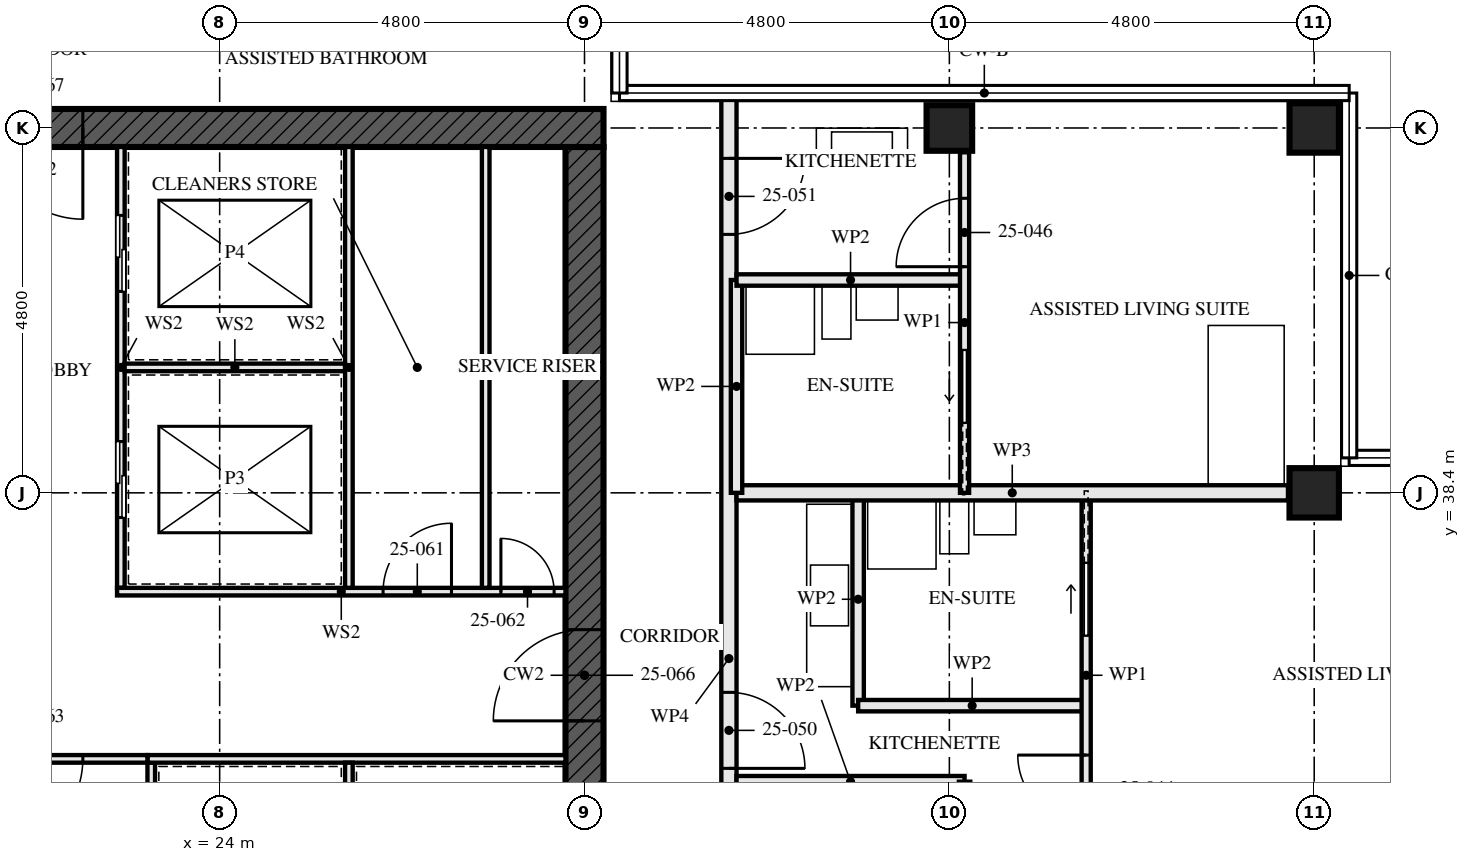
"""IFC4 building model, lengths in metres.
Left out: names, types, materials, properties, quantities, classifications, styles, units other than length and angle.
Written with IfcOpenShell. Run it as: python <this file> out.ifc"""

import sys

from ifc_helpers import new_model, si_unit, direction, frame, frame_2d, origin, origin_2d, place, context, subcontext, project, spatial, rectangle, hollow_rectangle, extrude, element, fill, save


model = new_model("IFC4")
c1 = context("Model", 3, precision=1e-05, world=origin(), true_north=direction((0.0, 1.0)))
c2 = subcontext(c1, "Body", "Model", "MODEL_VIEW")
j1 = project(units=[si_unit("LENGTHUNIT", "METRE"), si_unit("PLANEANGLEUNIT", "RADIAN")], contexts=[c1])
p1 = place(None, origin())
s1 = spatial("IfcSite", under=j1, at=p1, CompositionType="ELEMENT")
p2 = place(p1, origin())
s2 = spatial("IfcBuilding", under=s1, at=p2, CompositionType="ELEMENT")
p3 = place(p2, frame((0.0, 0.0, 94.5)))
s3 = spatial("IfcBuildingStorey", under=s2, at=p3, CompositionType="ELEMENT", Elevation=94.5)
p4 = place(p3, frame((33.6, 43.2, 0.0), z_axis=(0.0, 0.0, 1.0), x_axis=(0.0, 1.0, 0.0)))
e1 = element("IfcColumn", 1, at=p4, inside=s3, PredefinedType="COLUMN", context=c2, shape_type="SweptSolid", body=[
    extrude(hollow_rectangle(XDim=0.6, YDim=0.6, WallThickness=0.08, at=origin_2d()), origin(), (0.0, 0.0, 1.0), 3.5),
])
for number, where, z_axis, x_axis in (
    (2, (38.4, 38.4, 0.0), (0.0, 0.0, 1.0), (0.0, 1.0, 0.0)),
    (3, (38.4, 43.2, 0.0), (0.0, 0.0, 1.0), (0.0, 1.0, 0.0)),
):
    element("IfcColumn", number, at=place(p3, frame(where, z_axis=z_axis, x_axis=x_axis)), inside=s3, PredefinedType="COLUMN", context=c2, shape_type="SweptSolid", body=[
        extrude(hollow_rectangle(XDim=0.65, YDim=0.65, WallThickness=0.08, at=origin_2d()), origin(), (0.0, 0.0, 1.0), 3.5),
    ])
p5 = place(p3, frame((29.05, 43.2, -0.17), z_axis=(0.0, 0.0, 1.0), x_axis=(-1.0, 0.0, 0.0)))
e4 = element("IfcWall", 4, at=p5, inside=s3, PredefinedType="SHEAR", context=c2, shape_type="SweptSolid", body=[
    extrude(rectangle(XDim=14.9, YDim=0.5, at=frame_2d((7.45, 0.0))), origin(), (0.0, 0.0, 1.0), 3.5),
])
p6 = place(p5, frame((6.85, 0.0, 0.17)))
e5 = element("IfcOpeningElement", 5, at=p6, cuts=e4, PredefinedType="OPENING", context=c2, shape_type="SweptSolid", body=[
    extrude(rectangle(XDim=1.2, YDim=2.1, at=frame_2d((0.6, 1.05))), frame((0.0, 0.26, 0.0), z_axis=(0.0, -1.0, 0.0), x_axis=(1.0, 0.0, 0.0)), (0.0, 0.0, 1.0), 0.521),
])
p7 = place(p3, frame((28.8, 29.05, -0.17), z_axis=(0.0, 0.0, 1.0), x_axis=(0.0, 1.0, 0.0)))
e6 = element("IfcWall", 6, at=p7, inside=s3, PredefinedType="SHEAR", context=c2, shape_type="SweptSolid", body=[
    extrude(rectangle(XDim=13.9, YDim=0.5, at=frame_2d((6.95, 0.0))), origin(), (0.0, 0.0, 1.0), 3.5),
])
p8 = place(p7, frame((6.35, 0.0, 0.17)))
e7 = element("IfcOpeningElement", 7, at=p8, cuts=e6, PredefinedType="OPENING", context=c2, shape_type="SweptSolid", body=[
    extrude(rectangle(XDim=1.2, YDim=2.1, at=frame_2d((0.6, 1.05))), frame((0.0, 0.26, 0.0), z_axis=(0.0, -1.0, 0.0), x_axis=(1.0, 0.0, 0.0)), (0.0, 0.0, 1.0), 0.521),
])
p9 = place(p3, frame((33.8, 32.2, 0.0), z_axis=(0.0, 0.0, 1.0), x_axis=(0.0, 1.0, 0.0)))
e8 = element("IfcWall", 8, at=p9, inside=s3, PredefinedType="PARTITIONING", context=c2, shape_type="SweptSolid", body=[
    extrude(rectangle(XDim=2.4, YDim=0.15, at=frame_2d((1.2, 0.0))), origin(), (0.0, 0.0, 1.0), 2.55),
])
for number, where, z_axis, x_axis in (
    (9, (33.8, 34.6, 0.0), (0.0, 0.0, 1.0), (-1.0, 0.0, 0.0)),
    (10, (35.4, 35.6, 0.0), (0.0, 0.0, 1.0), (-1.0, 0.0, 0.0)),
):
    element("IfcWall", number, at=place(p3, frame(where, z_axis=z_axis, x_axis=x_axis)), inside=s3, PredefinedType="PARTITIONING", context=c2, shape_type="SweptSolid", body=[
        extrude(rectangle(XDim=3.0, YDim=0.15, at=frame_2d((1.5, 0.0))), origin(), (0.0, 0.0, 1.0), 3.33),
    ])
p10 = place(p3, frame((32.4, 35.6, 0.0), z_axis=(0.0, 0.0, 1.0), x_axis=(0.0, 1.0, 0.0)))
e11 = element("IfcWall", 11, at=p10, inside=s3, PredefinedType="PARTITIONING", context=c2, shape_type="SweptSolid", body=[
    extrude(rectangle(XDim=2.8, YDim=0.15, at=frame_2d((1.4, 0.0))), origin(), (0.0, 0.0, 1.0), 3.33),
])
p11 = place(p3, frame((35.4, 33.6, 0.0), z_axis=(0.0, 0.0, 1.0), x_axis=(0.0, 1.0, 0.0)))
e12 = element("IfcWall", 12, at=p11, inside=s3, PredefinedType="PARTITIONING", context=c2, shape_type="SweptSolid", body=[
    extrude(rectangle(XDim=4.8, YDim=0.12, at=frame_2d((2.4, 0.0))), origin(), (0.0, 0.0, 1.0), 3.33),
])
p12 = place(p11, frame((0.45, 0.0, 0.0)))
e13 = element("IfcOpeningElement", 13, at=p12, cuts=e12, PredefinedType="OPENING", context=c2, shape_type="SweptSolid", body=[
    extrude(rectangle(XDim=0.9, YDim=2.1, at=frame_2d((0.45, 1.05))), frame((0.0, 0.071, 0.0), z_axis=(0.0, -1.0, 0.0), x_axis=(1.0, 0.0, 0.0)), (0.0, 0.0, 1.0), 0.141),
])
p13 = place(p11, frame((2.925, 0.0, 0.0)))
e14 = element("IfcOpeningElement", 14, at=p13, cuts=e12, PredefinedType="OPENING", context=c2, shape_type="SweptSolid", body=[
    extrude(rectangle(XDim=0.95, YDim=2.1, at=frame_2d((0.475, 1.05))), frame((0.0, 0.071, 0.0), z_axis=(0.0, -1.0, 0.0), x_axis=(1.0, 0.0, 0.0)), (0.0, 0.0, 1.0), 0.141),
])
p14 = place(p3, frame((38.055, 38.4, 0.0), z_axis=(0.0, 0.0, 1.0), x_axis=(-1.0, 0.0, 0.0)))
e15 = element("IfcWall", 15, at=p14, inside=s3, PredefinedType="PARTITIONING", context=c2, shape_type="SweptSolid", body=[
    extrude(rectangle(XDim=7.255, YDim=0.2, at=frame_2d((3.627, 0.0))), origin(), (0.0, 0.0, 1.0), 2.55),
])
p15 = place(p3, frame((33.8, 41.2, 0.0), z_axis=(0.0, 0.0, 1.0), x_axis=(-1.0, 0.0, 0.0)))
e16 = element("IfcWall", 16, at=p15, inside=s3, PredefinedType="PARTITIONING", context=c2, shape_type="SweptSolid", body=[
    extrude(rectangle(XDim=3.0, YDim=0.15, at=frame_2d((1.5, 0.0))), origin(), (0.0, 0.0, 1.0), 3.33),
])
p16 = place(p3, frame((30.8, 38.4, 0.0), z_axis=(0.0, 0.0, 1.0), x_axis=(0.0, 1.0, 0.0)))
e17 = element("IfcWall", 17, at=p16, inside=s3, PredefinedType="PARTITIONING", context=c2, shape_type="SweptSolid", body=[
    extrude(rectangle(XDim=2.8, YDim=0.15, at=frame_2d((1.4, 0.0))), origin(), (0.0, 0.0, 1.0), 3.33),
])
p17 = place(p3, frame((33.8, 38.4, 0.0), z_axis=(0.0, 0.0, 1.0), x_axis=(0.0, 1.0, 0.0)))
e18 = element("IfcWall", 18, at=p17, inside=s3, PredefinedType="PARTITIONING", context=c2, shape_type="SweptSolid", body=[
    extrude(rectangle(XDim=4.48, YDim=0.12, at=frame_2d((2.24, 0.0))), origin(), (0.0, 0.0, 1.0), 3.33),
])
p18 = place(p17, frame((2.975, 0.0, 0.0)))
e19 = element("IfcOpeningElement", 19, at=p18, cuts=e18, PredefinedType="OPENING", context=c2, shape_type="SweptSolid", body=[
    extrude(rectangle(XDim=0.9, YDim=2.1, at=frame_2d((0.45, 1.05))), frame((0.0, 0.071, 0.0), z_axis=(0.0, -1.0, 0.0), x_axis=(1.0, 0.0, 0.0)), (0.0, 0.0, 1.0), 0.141),
])
p19 = place(p17, frame((0.925, 0.0, 0.0)))
e20 = element("IfcOpeningElement", 20, at=p19, cuts=e18, PredefinedType="OPENING", context=c2, shape_type="SweptSolid", body=[
    extrude(rectangle(XDim=0.95, YDim=2.1, at=frame_2d((0.475, 1.05))), frame((0.0, 0.071, 0.0), z_axis=(0.0, -1.0, 0.0), x_axis=(1.0, 0.0, 0.0)), (0.0, 0.0, 1.0), 0.141),
])
p20 = place(p3, frame((30.7, 28.8, 0.0), z_axis=(0.0, 0.0, 1.0), x_axis=(0.0, 1.0, 0.0)))
e21 = element("IfcWall", 21, at=p20, inside=s3, PredefinedType="PARTITIONING", context=c2, shape_type="SweptSolid", body=[
    extrude(rectangle(XDim=14.84, YDim=0.2, at=frame_2d((7.42, 0.0))), origin(), (0.0, 0.0, 1.0), 2.32),
])
p21 = place(p20, frame((1.4, 0.0, 0.0)))
e22 = element("IfcOpeningElement", 22, at=p21, cuts=e21, PredefinedType="OPENING", context=c2, shape_type="SweptSolid", body=[
    extrude(rectangle(XDim=1.0, YDim=2.1, at=frame_2d((0.5, 1.05))), frame((0.0, 0.111, 0.0), z_axis=(0.0, -1.0, 0.0), x_axis=(1.0, 0.0, 0.0)), (0.0, 0.0, 1.0), 0.221),
])
p22 = place(p20, frame((4.1, 0.0, 0.0)))
e23 = element("IfcOpeningElement", 23, at=p22, cuts=e21, PredefinedType="OPENING", context=c2, shape_type="SweptSolid", body=[
    extrude(rectangle(XDim=1.0, YDim=2.1, at=frame_2d((0.5, 1.05))), frame((0.0, 0.111, 0.0), z_axis=(0.0, -1.0, 0.0), x_axis=(1.0, 0.0, 0.0)), (0.0, 0.0, 1.0), 0.221),
])
p23 = place(p20, frame((5.975, 0.0, 0.0)))
e24 = element("IfcOpeningElement", 24, at=p23, cuts=e21, PredefinedType="OPENING", context=c2, shape_type="SweptSolid", body=[
    extrude(rectangle(XDim=1.0, YDim=2.1, at=frame_2d((0.5, 1.05))), frame((0.0, 0.111, 0.0), z_axis=(0.0, -1.0, 0.0), x_axis=(1.0, 0.0, 0.0)), (0.0, 0.0, 1.0), 0.221),
])
p24 = place(p20, frame((13.0, 0.0, 0.0)))
e25 = element("IfcOpeningElement", 25, at=p24, cuts=e21, PredefinedType="OPENING", context=c2, shape_type="SweptSolid", body=[
    extrude(rectangle(XDim=1.0, YDim=2.1, at=frame_2d((0.5, 1.05))), frame((0.0, 0.111, 0.0), z_axis=(0.0, -1.0, 0.0), x_axis=(1.0, 0.0, 0.0)), (0.0, 0.0, 1.0), 0.221),
])
p25 = place(p3, frame((27.5, 37.15, 0.0), z_axis=(0.0, 0.0, 1.0), x_axis=(0.0, 1.0, 0.0)))
e26 = element("IfcWall", 26, at=p25, inside=s3, PredefinedType="SOLIDWALL", context=c2, shape_type="SweptSolid", body=[
    extrude(rectangle(XDim=5.8, YDim=0.1, at=frame_2d((2.9, 0.0))), origin(), (0.0, 0.0, 1.0), 3.33),
])
p26 = place(p3, frame((22.7, 37.15, 0.0), z_axis=(0.0, 0.0, 1.0), x_axis=(0.0, 1.0, 0.0)))
e27 = element("IfcWall", 27, at=p26, inside=s3, PredefinedType="SOLIDWALL", context=c2, shape_type="SweptSolid", body=[
    extrude(rectangle(XDim=5.8, YDim=0.1, at=frame_2d((2.9, 0.0))), origin(), (0.0, 0.0, 1.0), 3.33),
])
p27 = place(p26, frame((0.925, 0.0, 0.0)))
e28 = element("IfcOpeningElement", 28, at=p27, cuts=e27, PredefinedType="OPENING", context=c2, shape_type="SweptSolid", body=[
    extrude(rectangle(XDim=1.0, YDim=2.1, at=frame_2d((0.5, 1.05))), frame((0.0, 0.061, 0.0), z_axis=(0.0, -1.0, 0.0), x_axis=(1.0, 0.0, 0.0)), (0.0, 0.0, 1.0), 0.121),
])
p28 = place(p26, frame((3.9, 0.0, 0.0)))
e29 = element("IfcOpeningElement", 29, at=p28, cuts=e27, PredefinedType="OPENING", context=c2, shape_type="SweptSolid", body=[
    extrude(rectangle(XDim=1.0, YDim=2.1, at=frame_2d((0.5, 1.05))), frame((0.0, 0.061, 0.0), z_axis=(0.0, -1.0, 0.0), x_axis=(1.0, 0.0, 0.0)), (0.0, 0.0, 1.0), 0.121),
])
p29 = place(p3, frame((23.1, 29.05, 0.0), z_axis=(0.0, 0.0, 1.0), x_axis=(0.0, 1.0, 0.0)))
e30 = element("IfcWall", 30, at=p29, inside=s3, PredefinedType="SOLIDWALL", context=c2, shape_type="SweptSolid", body=[
    extrude(rectangle(XDim=5.8, YDim=0.1, at=frame_2d((2.9, 0.0))), origin(), (0.0, 0.0, 1.0), 3.33),
])
p30 = place(p29, frame((1.0, 0.0, 0.0)))
e31 = element("IfcOpeningElement", 31, at=p30, cuts=e30, PredefinedType="OPENING", context=c2, shape_type="SweptSolid", body=[
    extrude(rectangle(XDim=0.7, YDim=2.1, at=frame_2d((0.35, 1.05))), frame((0.0, 0.061, 0.0), z_axis=(0.0, -1.0, 0.0), x_axis=(1.0, 0.0, 0.0)), (0.0, 0.0, 1.0), 0.121),
])
p31 = place(p3, frame((23.05, 34.9, 0.0), z_axis=(0.0, 0.0, 1.0), x_axis=(1.0, 0.0, 0.0)))
e32 = element("IfcWall", 32, at=p31, inside=s3, PredefinedType="SOLIDWALL", context=c2, shape_type="SweptSolid", body=[
    extrude(rectangle(XDim=5.5, YDim=0.1, at=frame_2d((2.75, 0.0))), origin(), (0.0, 0.0, 1.0), 3.33),
])
p32 = place(p3, frame((22.65, 37.1, 0.0), z_axis=(0.0, 0.0, 1.0), x_axis=(1.0, 0.0, 0.0)))
e33 = element("IfcWall", 33, at=p32, inside=s3, PredefinedType="SOLIDWALL", context=c2, shape_type="SweptSolid", body=[
    extrude(rectangle(XDim=5.9, YDim=0.1, at=frame_2d((2.95, 0.0))), origin(), (0.0, 0.0, 1.0), 3.33),
])
p33 = place(p32, frame((3.5, 0.0, 0.0)))
e34 = element("IfcOpeningElement", 34, at=p33, cuts=e33, PredefinedType="OPENING", context=c2, shape_type="SweptSolid", body=[
    extrude(rectangle(XDim=0.9, YDim=2.1, at=frame_2d((0.45, 1.05))), frame((0.0, 0.061, 0.0), z_axis=(0.0, -1.0, 0.0), x_axis=(1.0, 0.0, 0.0)), (0.0, 0.0, 1.0), 0.121),
])
p34 = place(p32, frame((5.05, 0.0, 0.0)))
e35 = element("IfcOpeningElement", 35, at=p34, cuts=e33, PredefinedType="OPENING", context=c2, shape_type="SweptSolid", body=[
    extrude(rectangle(XDim=0.7, YDim=2.1, at=frame_2d((0.35, 1.05))), frame((0.0, 0.061, 0.0), z_axis=(0.0, -1.0, 0.0), x_axis=(1.0, 0.0, 0.0)), (0.0, 0.0, 1.0), 0.121),
])
p35 = place(p3, frame((20.55, 34.9, 0.0), z_axis=(0.0, 0.0, 1.0), x_axis=(1.0, 0.0, 0.0)))
e36 = element("IfcWall", 36, at=p35, inside=s3, PredefinedType="SOLIDWALL", context=c2, shape_type="SweptSolid", body=[
    extrude(rectangle(XDim=2.5, YDim=0.1, at=frame_2d((1.25, 0.0))), origin(), (0.0, 0.0, 1.0), 3.33),
])
p36 = place(p35, frame((0.45, 0.0, 0.0)))
e37 = element("IfcOpeningElement", 37, at=p36, cuts=e36, PredefinedType="OPENING", context=c2, shape_type="SweptSolid", body=[
    extrude(rectangle(XDim=1.2, YDim=2.1, at=frame_2d((0.6, 1.05))), frame((0.0, 0.061, 0.0), z_axis=(0.0, -1.0, 0.0), x_axis=(1.0, 0.0, 0.0)), (0.0, 0.0, 1.0), 0.121),
])
p37 = place(p3, frame((22.75, 40.05, 0.0), z_axis=(0.0, 0.0, 1.0), x_axis=(1.0, 0.0, 0.0)))
e38 = element("IfcWall", 38, at=p37, inside=s3, PredefinedType="SOLIDWALL", context=c2, shape_type="SweptSolid", body=[
    extrude(rectangle(XDim=2.9, YDim=0.1, at=frame_2d((1.45, 0.0))), origin(), (0.0, 0.0, 1.0), 3.33),
])
p38 = place(p3, frame((25.7, 37.15, 0.0), z_axis=(0.0, 0.0, 1.0), x_axis=(0.0, 1.0, 0.0)))
e39 = element("IfcWall", 39, at=p38, inside=s3, PredefinedType="SOLIDWALL", context=c2, shape_type="SweptSolid", body=[
    extrude(rectangle(XDim=5.8, YDim=0.1, at=frame_2d((2.9, 0.0))), origin(), (0.0, 0.0, 1.0), 3.33),
])
p39 = place(p3, frame((25.7, 31.95, 0.0), z_axis=(0.0, 0.0, 1.0), x_axis=(0.0, 1.0, 0.0)))
e40 = element("IfcWall", 40, at=p39, inside=s3, PredefinedType="SOLIDWALL", context=c2, shape_type="SweptSolid", body=[
    extrude(rectangle(XDim=2.9, YDim=0.1, at=frame_2d((1.45, 0.0))), origin(), (0.0, 0.0, 1.0), 3.33),
])
p40 = place(p12, origin())
e41 = element("IfcDoor", 41, at=p40, inside=s3, OperationType="SINGLE_SWING_LEFT", PredefinedType="DOOR", context=c2, shape_type="SweptSolid", body=[
    extrude(rectangle(XDim=0.9, YDim=2.1, at=frame_2d((0.45, 1.05))), frame((0.0, 0.022, 0.0), z_axis=(0.0, -1.0, 0.0), x_axis=(1.0, 0.0, 0.0)), (0.0, 0.0, 1.0), 0.044),
])
fill(e13, e41)
p41 = place(p13, origin())
e42 = element("IfcDoor", 42, at=p41, inside=s3, OperationType="SLIDING_TO_LEFT", PredefinedType="DOOR", context=c2, shape_type="SweptSolid", body=[
    extrude(rectangle(XDim=0.95, YDim=2.1, at=frame_2d((0.475, 1.05))), frame((0.0, 0.022, 0.0), z_axis=(0.0, -1.0, 0.0), x_axis=(1.0, 0.0, 0.0)), (0.0, 0.0, 1.0), 0.044),
])
fill(e14, e42)
p42 = place(p18, origin())
e43 = element("IfcDoor", 43, at=p42, inside=s3, OperationType="SINGLE_SWING_RIGHT", PredefinedType="DOOR", context=c2, shape_type="SweptSolid", body=[
    extrude(rectangle(XDim=0.9, YDim=2.1, at=frame_2d((0.45, 1.05))), frame((0.0, 0.022, 0.0), z_axis=(0.0, -1.0, 0.0), x_axis=(1.0, 0.0, 0.0)), (0.0, 0.0, 1.0), 0.044),
])
fill(e19, e43)
p43 = place(p19, origin())
e44 = element("IfcDoor", 44, at=p43, inside=s3, OperationType="SLIDING_TO_RIGHT", PredefinedType="DOOR", context=c2, shape_type="SweptSolid", body=[
    extrude(rectangle(XDim=0.95, YDim=2.1, at=frame_2d((0.475, 1.05))), frame((0.0, 0.022, 0.0), z_axis=(0.0, -1.0, 0.0), x_axis=(1.0, 0.0, 0.0)), (0.0, 0.0, 1.0), 0.044),
])
fill(e20, e44)
p44 = place(p23, frame((1.0, 0.0, 0.0), z_axis=(0.0, 0.0, 1.0), x_axis=(-1.0, 0.0, 0.0)))
e45 = element("IfcDoor", 45, at=p44, inside=s3, OperationType="SINGLE_SWING_LEFT", PredefinedType="DOOR", context=c2, shape_type="SweptSolid", body=[
    extrude(rectangle(XDim=1.0, YDim=2.1, at=frame_2d((0.5, 1.05))), frame((0.0, 0.027, 0.0), z_axis=(0.0, -1.0, 0.0), x_axis=(1.0, 0.0, 0.0)), (0.0, 0.0, 1.0), 0.054),
])
fill(e24, e45)
p45 = place(p24, frame((1.0, 0.0, 0.0), z_axis=(0.0, 0.0, 1.0), x_axis=(-1.0, 0.0, 0.0)))
e46 = element("IfcDoor", 46, at=p45, inside=s3, OperationType="SINGLE_SWING_RIGHT", PredefinedType="DOOR", context=c2, shape_type="SweptSolid", body=[
    extrude(rectangle(XDim=1.0, YDim=2.1, at=frame_2d((0.5, 1.05))), frame((0.0, 0.027, 0.0), z_axis=(0.0, -1.0, 0.0), x_axis=(1.0, 0.0, 0.0)), (0.0, 0.0, 1.0), 0.054),
])
fill(e25, e46)
p46 = place(p27, origin())
e47 = element("IfcDoor", 47, at=p46, inside=s3, OperationType="SLIDING_TO_LEFT", PredefinedType="DOOR", context=c2, shape_type="SweptSolid", body=[
    extrude(rectangle(XDim=1.0, YDim=2.1, at=frame_2d((0.5, 1.05))), frame((0.0, 0.05, 0.0), z_axis=(0.0, -1.0, 0.0), x_axis=(1.0, 0.0, 0.0)), (0.0, 0.0, 1.0), 0.1),
])
fill(e28, e47)
p47 = place(p28, origin())
e48 = element("IfcDoor", 48, at=p47, inside=s3, OperationType="SLIDING_TO_LEFT", PredefinedType="DOOR", context=c2, shape_type="SweptSolid", body=[
    extrude(rectangle(XDim=1.0, YDim=2.1, at=frame_2d((0.5, 1.05))), frame((0.0, 0.05, 0.0), z_axis=(0.0, -1.0, 0.0), x_axis=(1.0, 0.0, 0.0)), (0.0, 0.0, 1.0), 0.1),
])
fill(e29, e48)
p48 = place(p33, origin())
e49 = element("IfcDoor", 49, at=p48, inside=s3, OperationType="SINGLE_SWING_LEFT", PredefinedType="DOOR", context=c2, shape_type="SweptSolid", body=[
    extrude(rectangle(XDim=0.9, YDim=2.1, at=frame_2d((0.45, 1.05))), frame((0.0, 0.027, 0.0), z_axis=(0.0, -1.0, 0.0), x_axis=(1.0, 0.0, 0.0)), (0.0, 0.0, 1.0), 0.054),
])
fill(e34, e49)
p49 = place(p34, origin())
e50 = element("IfcDoor", 50, at=p49, inside=s3, OperationType="SINGLE_SWING_RIGHT", PredefinedType="DOOR", context=c2, shape_type="SweptSolid", body=[
    extrude(rectangle(XDim=0.7, YDim=2.1, at=frame_2d((0.35, 1.05))), frame((0.0, 0.027, 0.0), z_axis=(0.0, -1.0, 0.0), x_axis=(1.0, 0.0, 0.0)), (0.0, 0.0, 1.0), 0.054),
])
fill(e35, e50)
p50 = place(p36, frame((1.2, 0.0, 0.0), z_axis=(0.0, 0.0, 1.0), x_axis=(-1.0, 0.0, 0.0)))
e51 = element("IfcDoor", 51, at=p50, inside=s3, OperationType="SINGLE_SWING_LEFT", PredefinedType="DOOR", context=c2, shape_type="SweptSolid", body=[
    extrude(rectangle(XDim=1.2, YDim=2.1, at=frame_2d((0.6, 1.05))), frame((0.0, 0.027, 0.0), z_axis=(0.0, -1.0, 0.0), x_axis=(1.0, 0.0, 0.0)), (0.0, 0.0, 1.0), 0.054),
])
fill(e37, e51)
p51 = place(p8, origin())
e52 = element("IfcDoor", 52, at=p51, inside=s3, OperationType="SINGLE_SWING_LEFT", PredefinedType="DOOR", context=c2, shape_type="SweptSolid", body=[
    extrude(rectangle(XDim=1.2, YDim=2.1, at=frame_2d((0.6, 1.05))), frame((0.0, 0.027, 0.0), z_axis=(0.0, -1.0, 0.0), x_axis=(1.0, 0.0, 0.0)), (0.0, 0.0, 1.0), 0.054),
])
fill(e7, e52)
p52 = place(p6, origin())
e53 = element("IfcDoor", 53, at=p52, inside=s3, OperationType="SINGLE_SWING_LEFT", PredefinedType="DOOR", context=c2, shape_type="SweptSolid", body=[
    extrude(rectangle(XDim=1.2, YDim=2.1, at=frame_2d((0.6, 1.05))), frame((0.0, 0.027, 0.0), z_axis=(0.0, -1.0, 0.0), x_axis=(1.0, 0.0, 0.0)), (0.0, 0.0, 1.0), 0.054),
])
fill(e5, e53)
save(model, sys.argv[1])
